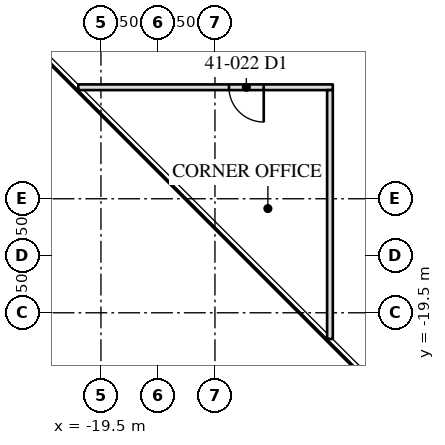
"""IFC4 building model, lengths in metres.
Left out: names, types, materials, properties, quantities, classifications, styles, units other than length and angle.
Written with IfcOpenShell. Run it as: python <this file> out.ifc"""

import sys

from ifc_helpers import new_model, si_unit, direction, frame, frame_2d, origin, place, context, subcontext, project, spatial, rectangle, extrude, element, fill, save


model = new_model("IFC4")
c1 = context("Model", 3, precision=1e-05, world=origin(), true_north=direction((0.0, 1.0)))
c2 = subcontext(c1, "Body", "Model", "MODEL_VIEW")
j1 = project(units=[si_unit("LENGTHUNIT", "METRE"), si_unit("PLANEANGLEUNIT", "RADIAN")], contexts=[c1])
p1 = place(None, origin())
s1 = spatial("IfcSite", under=j1, at=p1, CompositionType="ELEMENT")
p2 = place(p1, origin())
s2 = spatial("IfcBuilding", under=s1, at=p2, CompositionType="ELEMENT")
p3 = place(p2, frame((0.0, 0.0, 174.6)))
s3 = spatial("IfcBuildingStorey", under=s2, at=p3, CompositionType="ELEMENT", Elevation=174.6)
p4 = place(p3, frame((-13.399, -13.566, 0.0), z_axis=(0.0, 0.0, 1.0), x_axis=(-1.0, 0.0, 0.0)))
e1 = element("IfcWall", 1, at=p4, inside=s3, PredefinedType="PARTITIONING", context=c2, shape_type="SweptSolid", body=[
    extrude(rectangle(XDim=6.698, YDim=0.15, at=frame_2d((3.349, 0.0))), origin(), (0.0, 0.0, 1.0), 3.91),
])
p5 = place(p4, frame((1.817, 0.0, 0.0)))
e2 = element("IfcOpeningElement", 2, at=p5, cuts=e1, PredefinedType="OPENING", context=c2, shape_type="SweptSolid", body=[
    extrude(rectangle(XDim=0.915, YDim=2.134, at=frame_2d((0.458, 1.067))), frame((0.0, 0.085, 0.0), z_axis=(0.0, -1.0, 0.0), x_axis=(1.0, 0.0, 0.0)), (0.0, 0.0, 1.0), 0.17),
])
p6 = place(p3, frame((-13.474, -13.641, 0.0), z_axis=(0.0, 0.0, 1.0), x_axis=(0.0, -1.0, 0.0)))
e3 = element("IfcWall", 3, at=p6, inside=s3, PredefinedType="PARTITIONING", context=c2, shape_type="SweptSolid", body=[
    extrude(rectangle(XDim=6.548, YDim=0.15, at=frame_2d((3.274, 0.0))), origin(), (0.0, 0.0, 1.0), 3.91),
])
p7 = place(p5, origin())
e4 = element("IfcDoor", 4, at=p7, inside=s3, OperationType="SINGLE_SWING_LEFT", PredefinedType="DOOR", context=c2, shape_type="SweptSolid", body=[
    extrude(rectangle(XDim=0.915, YDim=2.134, at=frame_2d((0.458, 1.067))), frame((0.0, 0.025, 0.0), z_axis=(0.0, -1.0, 0.0), x_axis=(1.0, 0.0, 0.0)), (0.0, 0.0, 1.0), 0.05),
])
fill(e2, e4)
save(model, sys.argv[1])
